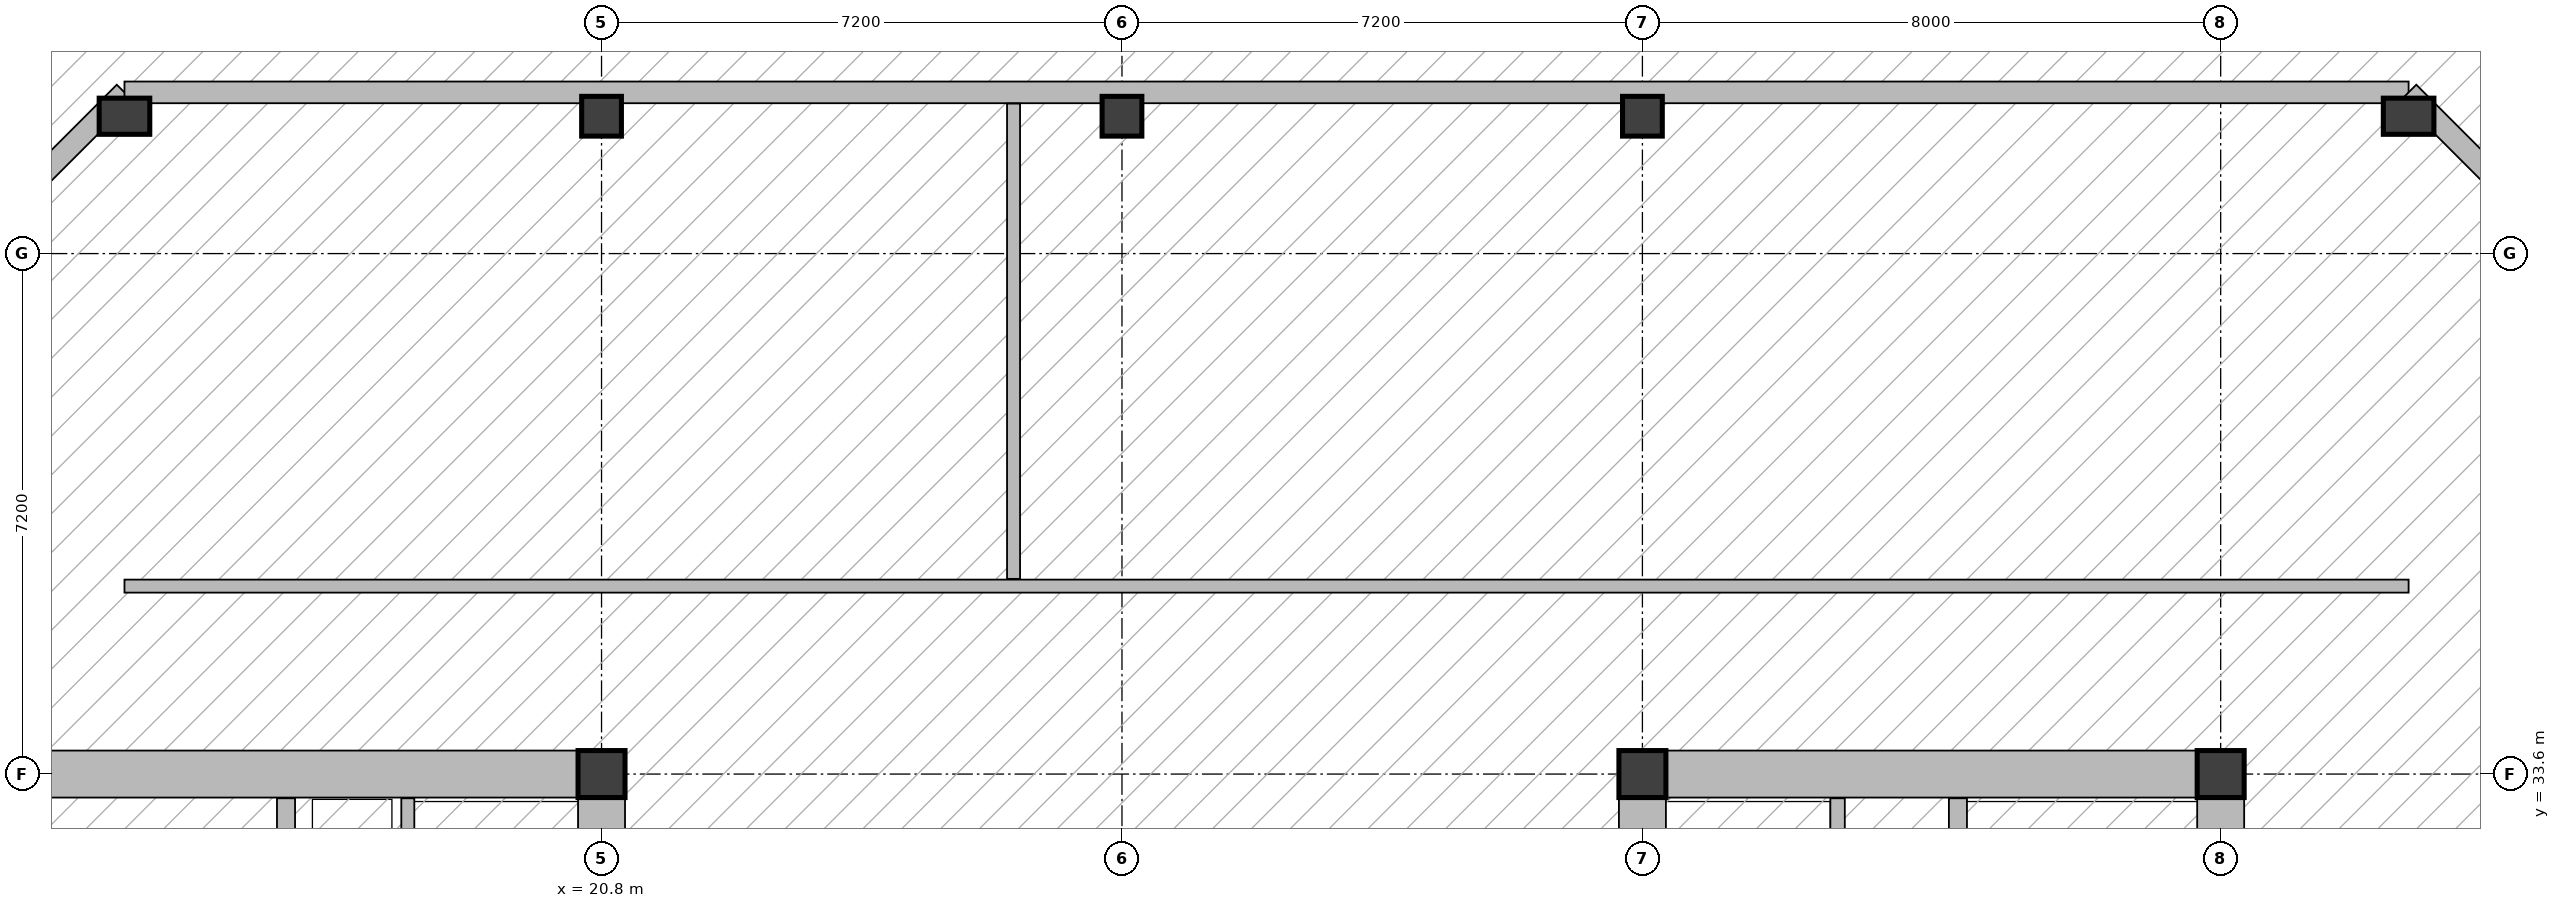
"""IFC4 building model, lengths in metres.
Left out: names, types, materials, properties, quantities, classifications, styles, units other than length and angle.
Written with IfcOpenShell. Run it as: python <this file> out.ifc"""

import sys

from ifc_helpers import new_model, si_unit, direction, frame, frame_2d, origin, origin_2d, place, context, subcontext, project, spatial, rectangle, extrude, element, fill, save


model = new_model("IFC4")
c1 = context("Model", 3, precision=1e-05, world=origin(), true_north=direction((0.0, 1.0)))
c2 = subcontext(c1, "Body", "Model", "MODEL_VIEW")
j1 = project(units=[si_unit("LENGTHUNIT", "METRE"), si_unit("PLANEANGLEUNIT", "RADIAN")], contexts=[c1])
p1 = place(None, origin())
s1 = spatial("IfcSite", under=j1, at=p1, CompositionType="ELEMENT")
p2 = place(p1, origin())
s2 = spatial("IfcBuilding", under=s1, at=p2, CompositionType="ELEMENT")
p3 = place(p2, frame((0.0, 0.0, 292.2)))
s3 = spatial("IfcBuildingStorey", under=s2, at=p3, CompositionType="ELEMENT", Elevation=292.2)
for number, where, z_axis, x_axis in (
    (1, (20.8, 33.6, 0.0), (0.0, 0.0, 1.0), (1.0, 0.0, 0.0)),
    (2, (35.2, 33.6, 0.0), (0.0, 0.0, 1.0), (1.0, 0.0, 0.0)),
    (3, (43.2, 33.6, 0.0), (0.0, 0.0, 1.0), (1.0, 0.0, 0.0)),
):
    element("IfcColumn", number, at=place(p3, frame(where, z_axis=z_axis, x_axis=x_axis)), inside=s3, PredefinedType="COLUMN", context=c2, shape_type="SweptSolid", body=[
        extrude(rectangle(XDim=0.65, YDim=0.65, at=origin_2d()), origin(), (0.0, 0.0, 1.0), 4.2),
    ])
p4 = place(p3, frame((14.2, 42.7, 0.0), z_axis=(0.0, 0.0, 1.0), x_axis=(1.0, 0.0, 0.0)))
e4 = element("IfcColumn", 4, at=p4, inside=s3, PredefinedType="COLUMN", context=c2, shape_type="SweptSolid", body=[
    extrude(rectangle(XDim=0.5, YDim=0.7, at=origin_2d()), origin(), (0.0, 0.0, 1.0), 4.2),
])
for number, where, z_axis, x_axis in (
    (5, (20.8, 42.7, 0.0), (0.0, 0.0, 1.0), (1.0, 0.0, 0.0)),
    (6, (28.0, 42.7, 0.0), (0.0, 0.0, 1.0), (1.0, 0.0, 0.0)),
    (7, (35.2, 42.7, 0.0), (0.0, 0.0, 1.0), (1.0, 0.0, 0.0)),
):
    element("IfcColumn", number, at=place(p3, frame(where, z_axis=z_axis, x_axis=x_axis)), inside=s3, PredefinedType="COLUMN", context=c2, shape_type="SweptSolid", body=[
        extrude(rectangle(XDim=0.55, YDim=0.55, at=origin_2d()), origin(), (0.0, 0.0, 1.0), 4.2),
    ])
p5 = place(p3, frame((45.8, 42.7, 0.0), z_axis=(0.0, 0.0, 1.0), x_axis=(1.0, 0.0, 0.0)))
e8 = element("IfcColumn", 8, at=p5, inside=s3, PredefinedType="COLUMN", context=c2, shape_type="SweptSolid", body=[
    extrude(rectangle(XDim=0.5, YDim=0.7, at=origin_2d()), origin(), (0.0, 0.0, 1.0), 4.2),
])
p6 = place(p3, frame((10.87, 39.7, 0.0), z_axis=(0.0, 0.0, 1.0), x_axis=(0.707080859425, 0.707132701998, 0.0)))
e9 = element("IfcWall", 9, at=p6, inside=s3, PredefinedType="STANDARD", context=c2, shape_type="SweptSolid", body=[
    extrude(rectangle(XDim=4.709, YDim=0.3, at=frame_2d((2.354, 0.0))), origin(), (0.0, 0.0, 1.0), 3.545),
])
p7 = place(p3, frame((14.2, 43.03, 0.0), z_axis=(0.0, 0.0, 1.0), x_axis=(1.0, 0.0, 0.0)))
e10 = element("IfcWall", 10, at=p7, inside=s3, PredefinedType="STANDARD", context=c2, shape_type="SweptSolid", body=[
    extrude(rectangle(XDim=31.6, YDim=0.3, at=frame_2d((15.8, 0.0))), origin(), (0.0, 0.0, 1.0), 3.545),
])
p8 = place(p3, frame((45.8, 43.03, 0.0), z_axis=(0.0, 0.0, 1.0), x_axis=(0.707080859425, -0.707132701998, 0.0)))
e11 = element("IfcWall", 11, at=p8, inside=s3, PredefinedType="STANDARD", context=c2, shape_type="SweptSolid", body=[
    extrude(rectangle(XDim=4.709, YDim=0.3, at=frame_2d((2.354, 0.0))), origin(), (0.0, 0.0, 1.0), 3.545),
])
p9 = place(p3, frame((13.13, 33.6, 0.0), z_axis=(0.0, 0.0, 1.0), x_axis=(1.0, 0.0, 0.0)))
e12 = element("IfcWall", 12, at=p9, inside=s3, PredefinedType="SHEAR", context=c2, shape_type="SweptSolid", body=[
    extrude(rectangle(XDim=7.34, YDim=0.65, at=frame_2d((3.67, 0.0))), origin(), (0.0, 0.0, 1.0), 3.92),
])
p10 = place(p9, frame((1.27, 0.0, 0.0)))
e13 = element("IfcOpeningElement", 13, at=p10, cuts=e12, PredefinedType="OPENING", context=c2, shape_type="SweptSolid", body=[
    extrude(rectangle(XDim=0.85, YDim=2.02, at=frame_2d((0.425, 1.01))), frame((0.0, 0.335, 0.0), z_axis=(0.0, -1.0, 0.0), x_axis=(1.0, 0.0, 0.0)), (0.0, 0.0, 1.0), 0.67),
])
p11 = place(p3, frame((20.8, 31.1, 0.0), z_axis=(0.0, 0.0, 1.0), x_axis=(0.0, 1.0, 0.0)))
e14 = element("IfcWall", 14, at=p11, inside=s3, PredefinedType="SHEAR", context=c2, shape_type="SweptSolid", body=[
    extrude(rectangle(XDim=2.17, YDim=0.65, at=frame_2d((1.085, 0.0))), origin(), (0.0, 0.0, 1.0), 3.92),
])
p12 = place(p3, frame((16.435, 21.135, 0.0), z_axis=(0.0, 0.0, 1.0), x_axis=(0.0, 1.0, 0.0)))
e15 = element("IfcWall", 15, at=p12, inside=s3, PredefinedType="SHEAR", context=c2, shape_type="SweptSolid", body=[
    extrude(rectangle(XDim=12.13, YDim=0.25, at=frame_2d((6.065, 0.0))), origin(), (0.0, 0.0, 1.0), 3.92),
])
p13 = place(p12, frame((0.515, 0.0, 0.0)))
e16 = element("IfcOpeningElement", 16, at=p13, cuts=e15, PredefinedType="OPENING", context=c2, shape_type="SweptSolid", body=[
    extrude(rectangle(XDim=1.2, YDim=2.15, at=frame_2d((0.6, 1.075))), frame((0.0, 0.135, 0.0), z_axis=(0.0, -1.0, 0.0), x_axis=(1.0, 0.0, 0.0)), (0.0, 0.0, 1.0), 0.27),
])
p14 = place(p12, frame((2.665, 0.0, 0.0)))
e17 = element("IfcOpeningElement", 17, at=p14, cuts=e15, PredefinedType="OPENING", context=c2, shape_type="SweptSolid", body=[
    extrude(rectangle(XDim=1.15, YDim=2.15, at=frame_2d((0.575, 1.075))), frame((0.0, 0.135, 0.0), z_axis=(0.0, -1.0, 0.0), x_axis=(1.0, 0.0, 0.0)), (0.0, 0.0, 1.0), 0.27),
])
p15 = place(p3, frame((18.12, 31.17, 0.0), z_axis=(0.0, 0.0, 1.0), x_axis=(0.0, 1.0, 0.0)))
e18 = element("IfcWall", 18, at=p15, inside=s3, PredefinedType="PARTITIONING", context=c2, shape_type="SweptSolid", body=[
    extrude(rectangle(XDim=2.095, YDim=0.18, at=frame_2d((1.047, 0.0))), origin(), (0.0, 0.0, 1.0), 3.92),
])
p16 = place(p3, frame((43.2, 21.13, 0.0), z_axis=(0.0, 0.0, 1.0), x_axis=(0.0, 1.0, 0.0)))
e19 = element("IfcWall", 19, at=p16, inside=s3, PredefinedType="SHEAR", context=c2, shape_type="SweptSolid", body=[
    extrude(rectangle(XDim=12.14, YDim=0.65, at=frame_2d((6.07, 0.0))), origin(), (0.0, 0.0, 1.0), 3.92),
])
p17 = place(p3, frame((35.53, 33.6, 0.0), z_axis=(0.0, 0.0, 1.0), x_axis=(1.0, 0.0, 0.0)))
e20 = element("IfcWall", 20, at=p17, inside=s3, PredefinedType="SHEAR", context=c2, shape_type="SweptSolid", body=[
    extrude(rectangle(XDim=7.34, YDim=0.65, at=frame_2d((3.67, 0.0))), origin(), (0.0, 0.0, 1.0), 3.92),
])
p18 = place(p17, frame((4.87, 0.0, 0.0)))
e21 = element("IfcOpeningElement", 21, at=p18, cuts=e20, PredefinedType="OPENING", context=c2, shape_type="SweptSolid", body=[
    extrude(rectangle(XDim=1.3, YDim=2.15, at=frame_2d((0.65, 1.075))), frame((0.0, 0.335, 0.0), z_axis=(0.0, -1.0, 0.0), x_axis=(1.0, 0.0, 0.0)), (0.0, 0.0, 1.0), 0.67),
])
p19 = place(p17, frame((2.67, 0.0, 0.0)))
e22 = element("IfcOpeningElement", 22, at=p19, cuts=e20, PredefinedType="OPENING", context=c2, shape_type="SweptSolid", body=[
    extrude(rectangle(XDim=0.85, YDim=2.02, at=frame_2d((0.425, 1.01))), frame((0.0, 0.335, 0.0), z_axis=(0.0, -1.0, 0.0), x_axis=(1.0, 0.0, 0.0)), (0.0, 0.0, 1.0), 0.67),
])
p20 = place(p3, frame((35.2, 31.1, 0.0), z_axis=(0.0, 0.0, 1.0), x_axis=(0.0, 1.0, 0.0)))
e23 = element("IfcWall", 23, at=p20, inside=s3, PredefinedType="SHEAR", context=c2, shape_type="SweptSolid", body=[
    extrude(rectangle(XDim=2.17, YDim=0.65, at=frame_2d((1.085, 0.0))), origin(), (0.0, 0.0, 1.0), 3.92),
])
p21 = place(p3, frame((39.565, 21.135, 0.0), z_axis=(0.0, 0.0, 1.0), x_axis=(0.0, 1.0, 0.0)))
e24 = element("IfcWall", 24, at=p21, inside=s3, PredefinedType="SHEAR", context=c2, shape_type="SweptSolid", body=[
    extrude(rectangle(XDim=12.13, YDim=0.25, at=frame_2d((6.065, 0.0))), origin(), (0.0, 0.0, 1.0), 3.92),
])
p22 = place(p21, frame((0.515, 0.0, 0.0)))
e25 = element("IfcOpeningElement", 25, at=p22, cuts=e24, PredefinedType="OPENING", context=c2, shape_type="SweptSolid", body=[
    extrude(rectangle(XDim=1.2, YDim=2.15, at=frame_2d((0.6, 1.075))), frame((0.0, 0.135, 0.0), z_axis=(0.0, -1.0, 0.0), x_axis=(1.0, 0.0, 0.0)), (0.0, 0.0, 1.0), 0.27),
])
p23 = place(p21, frame((2.665, 0.0, 0.0)))
e26 = element("IfcOpeningElement", 26, at=p23, cuts=e24, PredefinedType="OPENING", context=c2, shape_type="SweptSolid", body=[
    extrude(rectangle(XDim=1.15, YDim=2.15, at=frame_2d((0.575, 1.075))), frame((0.0, 0.135, 0.0), z_axis=(0.0, -1.0, 0.0), x_axis=(1.0, 0.0, 0.0)), (0.0, 0.0, 1.0), 0.27),
])
p24 = place(p3, frame((37.9, 25.27, 0.0), z_axis=(0.0, 0.0, 1.0), x_axis=(0.0, 1.0, 0.0)))
e27 = element("IfcWall", 27, at=p24, inside=s3, PredefinedType="SOLIDWALL", context=c2, shape_type="SweptSolid", body=[
    extrude(rectangle(XDim=7.995, YDim=0.2, at=frame_2d((3.998, 0.0))), origin(), (0.0, 0.0, 1.0), 3.92),
])
p25 = place(p3, frame((14.2, 36.2, 0.0), z_axis=(0.0, 0.0, 1.0), x_axis=(1.0, 0.0, 0.0)))
e28 = element("IfcWall", 28, at=p25, inside=s3, PredefinedType="PARTITIONING", context=c2, shape_type="SweptSolid", body=[
    extrude(rectangle(XDim=31.6, YDim=0.18, at=frame_2d((15.8, 0.0))), origin(), (0.0, 0.0, 1.0), 3.92),
])
p26 = place(p25, frame((4.5, 0.0, 0.0)))
e29 = element("IfcOpeningElement", 29, at=p26, cuts=e28, PredefinedType="OPENING", context=c2, shape_type="SweptSolid", body=[
    extrude(rectangle(XDim=1.1, YDim=2.15, at=frame_2d((0.55, 1.075))), frame((0.0, 0.1, 0.0), z_axis=(0.0, -1.0, 0.0), x_axis=(1.0, 0.0, 0.0)), (0.0, 0.0, 1.0), 0.2),
])
p27 = place(p25, frame((16.8, 0.0, 0.0)))
e30 = element("IfcOpeningElement", 30, at=p27, cuts=e28, PredefinedType="OPENING", context=c2, shape_type="SweptSolid", body=[
    extrude(rectangle(XDim=1.1, YDim=2.15, at=frame_2d((0.55, 1.075))), frame((0.0, 0.1, 0.0), z_axis=(0.0, -1.0, 0.0), x_axis=(1.0, 0.0, 0.0)), (0.0, 0.0, 1.0), 0.2),
])
p28 = place(p3, frame((26.5, 36.3, 0.0), z_axis=(0.0, 0.0, 1.0), x_axis=(0.0, 1.0, 0.0)))
e31 = element("IfcWall", 31, at=p28, inside=s3, PredefinedType="PARTITIONING", context=c2, shape_type="SweptSolid", body=[
    extrude(rectangle(XDim=6.575, YDim=0.18, at=frame_2d((3.288, 0.0))), origin(), (0.0, 0.0, 1.0), 3.92),
])
p29 = place(p10, origin())
e32 = element("IfcDoor", 32, at=p29, inside=s3, OperationType="SINGLE_SWING_LEFT", PredefinedType="DOOR", context=c2, shape_type="SweptSolid", body=[
    extrude(rectangle(XDim=0.85, YDim=2.02, at=frame_2d((0.425, 1.01))), frame((0.0, 0.025, 0.0), z_axis=(0.0, -1.0, 0.0), x_axis=(1.0, 0.0, 0.0)), (0.0, 0.0, 1.0), 0.05),
])
fill(e13, e32)
p30 = place(p18, origin())
e33 = element("IfcDoor", 33, at=p30, inside=s3, OperationType="DOUBLE_DOOR_SLIDING", PredefinedType="DOOR", context=c2, shape_type="SweptSolid", body=[
    extrude(rectangle(XDim=1.3, YDim=2.15, at=frame_2d((0.65, 1.075))), frame((0.0, 0.025, 0.0), z_axis=(0.0, -1.0, 0.0), x_axis=(1.0, 0.0, 0.0)), (0.0, 0.0, 1.0), 0.05),
])
fill(e21, e33)
p31 = place(p19, origin())
e34 = element("IfcDoor", 34, at=p31, inside=s3, OperationType="SINGLE_SWING_LEFT", PredefinedType="DOOR", context=c2, shape_type="SweptSolid", body=[
    extrude(rectangle(XDim=0.85, YDim=2.02, at=frame_2d((0.425, 1.01))), frame((0.0, 0.025, 0.0), z_axis=(0.0, -1.0, 0.0), x_axis=(1.0, 0.0, 0.0)), (0.0, 0.0, 1.0), 0.05),
])
fill(e22, e34)
p32 = place(p26, origin())
e35 = element("IfcDoor", 35, at=p32, inside=s3, OperationType="SINGLE_SWING_LEFT", PredefinedType="DOOR", context=c2, shape_type="SweptSolid", body=[
    extrude(rectangle(XDim=1.1, YDim=2.15, at=frame_2d((0.55, 1.075))), frame((0.0, 0.025, 0.0), z_axis=(0.0, -1.0, 0.0), x_axis=(1.0, 0.0, 0.0)), (0.0, 0.0, 1.0), 0.05),
])
fill(e29, e35)
p33 = place(p27, origin())
e36 = element("IfcDoor", 36, at=p33, inside=s3, OperationType="SINGLE_SWING_RIGHT", PredefinedType="DOOR", context=c2, shape_type="SweptSolid", body=[
    extrude(rectangle(XDim=1.1, YDim=2.15, at=frame_2d((0.55, 1.075))), frame((0.0, 0.025, 0.0), z_axis=(0.0, -1.0, 0.0), x_axis=(1.0, 0.0, 0.0)), (0.0, 0.0, 1.0), 0.05),
])
fill(e30, e36)
save(model, sys.argv[1])
